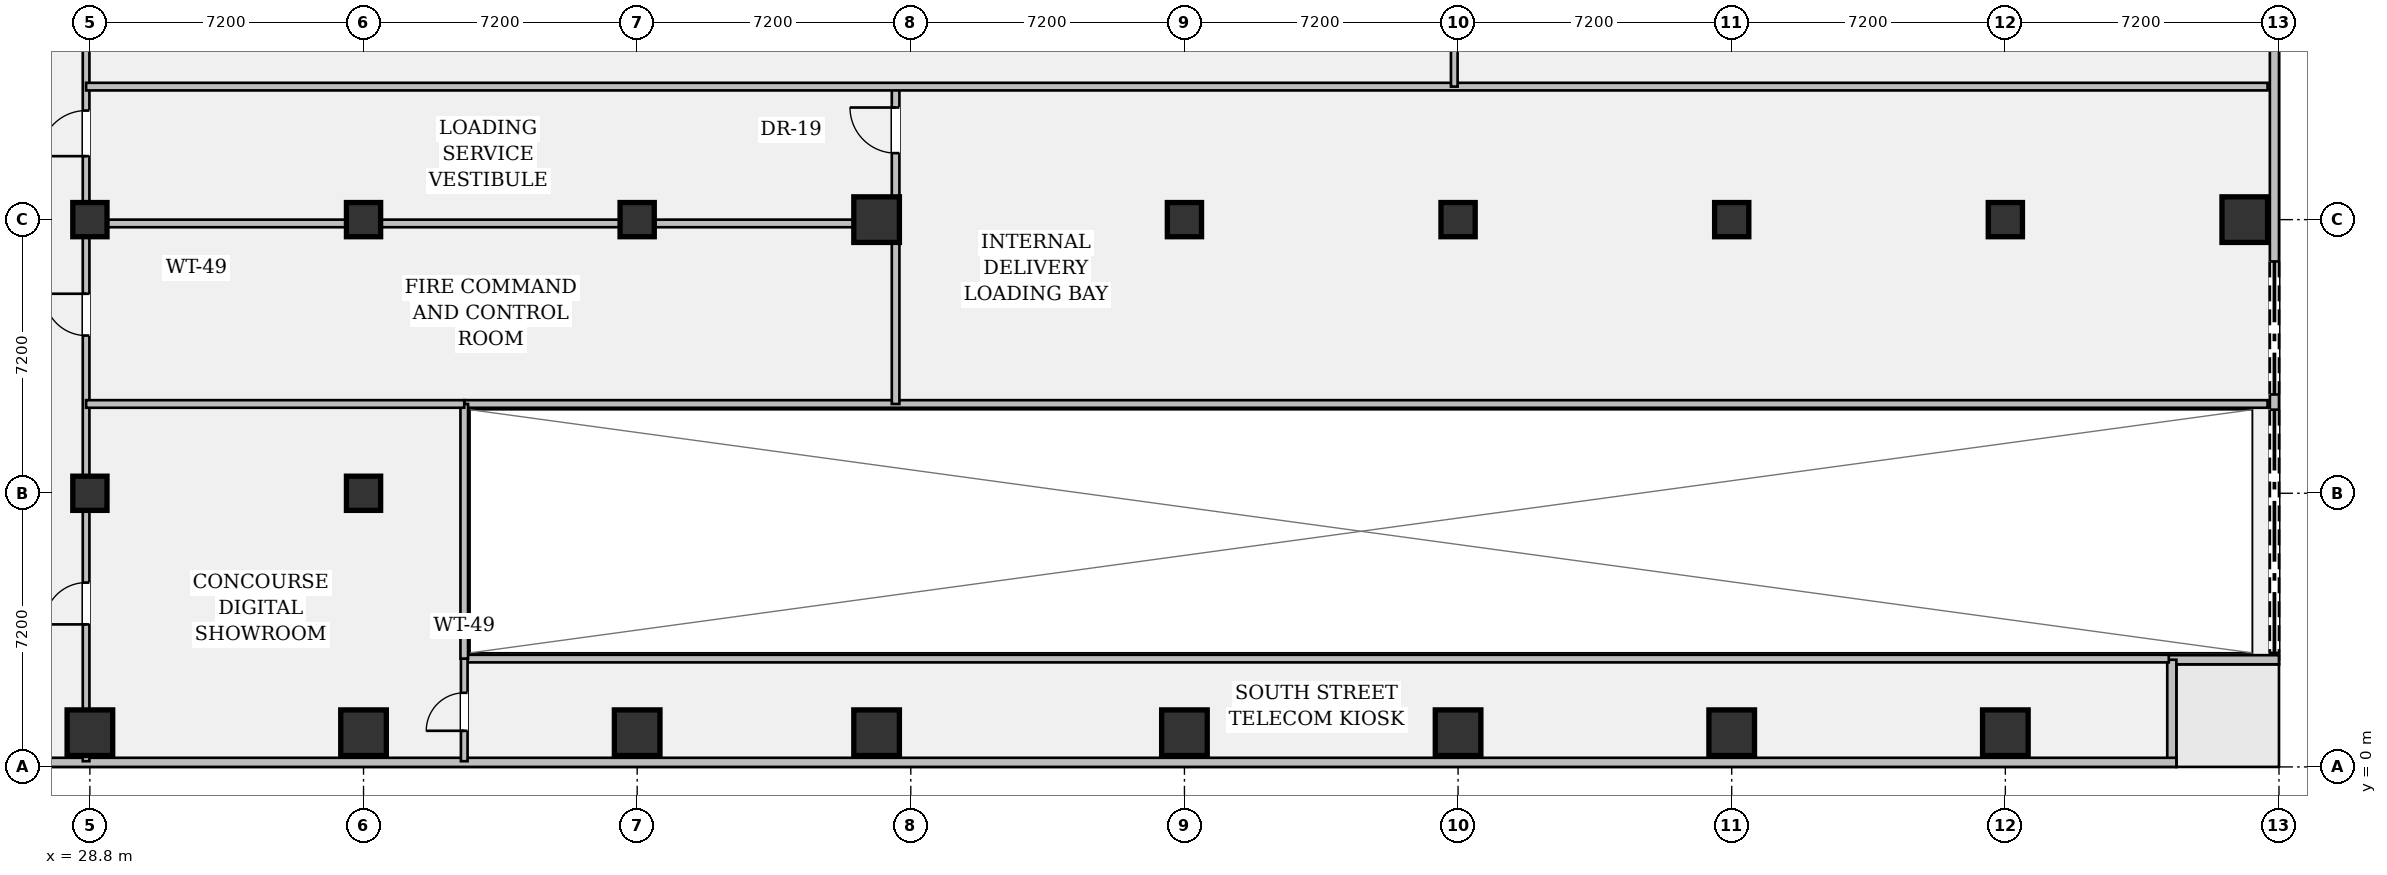
"""IFC4 building model, lengths in metres.
Left out: names, types, materials, properties, quantities, classifications, styles, units other than length and angle.
Written with IfcOpenShell. Run it as: python <this file> out.ifc"""

import sys

from ifc_helpers import new_model, si_unit, direction, frame, frame_2d, origin, origin_2d, place, context, subcontext, project, spatial, rectangle, hollow_rectangle, extrude, element, fill, save


model = new_model("IFC4")
c1 = context("Model", 3, precision=1e-05, world=origin(), true_north=direction((0.0, 1.0)))
c2 = subcontext(c1, "Body", "Model", "MODEL_VIEW")
j1 = project(units=[si_unit("LENGTHUNIT", "METRE"), si_unit("PLANEANGLEUNIT", "RADIAN")], contexts=[c1])
p1 = place(None, origin())
s1 = spatial("IfcSite", under=j1, at=p1, CompositionType="ELEMENT")
p2 = place(p1, origin())
s2 = spatial("IfcBuilding", under=s1, at=p2, CompositionType="ELEMENT")
p3 = place(p2, origin())
s3 = spatial("IfcBuildingStorey", under=s2, at=p3, CompositionType="ELEMENT", Elevation=0.0)
p4 = place(p3, frame((28.8, 0.9, 0.0), z_axis=(0.0, 0.0, 1.0), x_axis=(1.0, 0.0, 0.0)))
e1 = element("IfcColumn", 1, at=p4, inside=s3, PredefinedType="COLUMN", context=c2, shape_type="SweptSolid", body=[
    extrude(hollow_rectangle(XDim=1.2, YDim=1.2, WallThickness=0.075, at=origin_2d()), origin(), (0.0, 0.0, 1.0), 4.95),
])
for number, where, z_axis, x_axis in (
    (2, (28.8, 7.2, 0.0), (0.0, 0.0, 1.0), (1.0, 0.0, 0.0)),
    (3, (28.8, 14.4, 0.0), (0.0, 0.0, 1.0), (1.0, 0.0, 0.0)),
):
    element("IfcColumn", number, at=place(p3, frame(where, z_axis=z_axis, x_axis=x_axis)), inside=s3, PredefinedType="COLUMN", context=c2, shape_type="SweptSolid", body=[
        extrude(rectangle(XDim=0.9, YDim=0.9, at=origin_2d()), origin(), (0.0, 0.0, 1.0), 4.95),
    ])
p5 = place(p3, frame((36.0, 0.9, 0.0), z_axis=(0.0, 0.0, 1.0), x_axis=(1.0, 0.0, 0.0)))
e4 = element("IfcColumn", 4, at=p5, inside=s3, PredefinedType="COLUMN", context=c2, shape_type="SweptSolid", body=[
    extrude(hollow_rectangle(XDim=1.2, YDim=1.2, WallThickness=0.075, at=origin_2d()), origin(), (0.0, 0.0, 1.0), 4.95),
])
for number, where, z_axis, x_axis in (
    (5, (36.0, 7.2, 0.0), (0.0, 0.0, 1.0), (1.0, 0.0, 0.0)),
    (6, (36.0, 14.4, 0.0), (0.0, 0.0, 1.0), (1.0, 0.0, 0.0)),
):
    element("IfcColumn", number, at=place(p3, frame(where, z_axis=z_axis, x_axis=x_axis)), inside=s3, PredefinedType="COLUMN", context=c2, shape_type="SweptSolid", body=[
        extrude(rectangle(XDim=0.9, YDim=0.9, at=origin_2d()), origin(), (0.0, 0.0, 1.0), 4.95),
    ])
p6 = place(p3, frame((43.2, 0.9, 0.0), z_axis=(0.0, 0.0, 1.0), x_axis=(1.0, 0.0, 0.0)))
e7 = element("IfcColumn", 7, at=p6, inside=s3, PredefinedType="COLUMN", context=c2, shape_type="SweptSolid", body=[
    extrude(hollow_rectangle(XDim=1.2, YDim=1.2, WallThickness=0.075, at=origin_2d()), origin(), (0.0, 0.0, 1.0), 4.95),
])
p7 = place(p3, frame((43.2, 14.4, 0.0), z_axis=(0.0, 0.0, 1.0), x_axis=(1.0, 0.0, 0.0)))
e8 = element("IfcColumn", 8, at=p7, inside=s3, PredefinedType="COLUMN", context=c2, shape_type="SweptSolid", body=[
    extrude(rectangle(XDim=0.9, YDim=0.9, at=origin_2d()), origin(), (0.0, 0.0, 1.0), 4.95),
])
for number, where, z_axis, x_axis in (
    (9, (49.5, 0.9, 0.0), (0.0, 0.0, 1.0), (1.0, 0.0, 0.0)),
    (10, (49.5, 14.4, 0.0), (0.0, 0.0, 1.0), (1.0, 0.0, 0.0)),
    (11, (57.6, 0.9, 0.0), (0.0, 0.0, 1.0), (1.0, 0.0, 0.0)),
):
    element("IfcColumn", number, at=place(p3, frame(where, z_axis=z_axis, x_axis=x_axis)), inside=s3, PredefinedType="COLUMN", context=c2, shape_type="SweptSolid", body=[
        extrude(hollow_rectangle(XDim=1.2, YDim=1.2, WallThickness=0.075, at=origin_2d()), origin(), (0.0, 0.0, 1.0), 4.95),
    ])
p8 = place(p3, frame((57.6, 14.4, 0.0), z_axis=(0.0, 0.0, 1.0), x_axis=(1.0, 0.0, 0.0)))
e12 = element("IfcColumn", 12, at=p8, inside=s3, PredefinedType="COLUMN", context=c2, shape_type="SweptSolid", body=[
    extrude(rectangle(XDim=0.9, YDim=0.9, at=origin_2d()), origin(), (0.0, 0.0, 1.0), 4.95),
])
p9 = place(p3, frame((64.8, 0.9, 0.0), z_axis=(0.0, 0.0, 1.0), x_axis=(1.0, 0.0, 0.0)))
e13 = element("IfcColumn", 13, at=p9, inside=s3, PredefinedType="COLUMN", context=c2, shape_type="SweptSolid", body=[
    extrude(hollow_rectangle(XDim=1.2, YDim=1.2, WallThickness=0.075, at=origin_2d()), origin(), (0.0, 0.0, 1.0), 4.95),
])
p10 = place(p3, frame((64.8, 14.4, 0.0), z_axis=(0.0, 0.0, 1.0), x_axis=(1.0, 0.0, 0.0)))
e14 = element("IfcColumn", 14, at=p10, inside=s3, PredefinedType="COLUMN", context=c2, shape_type="SweptSolid", body=[
    extrude(rectangle(XDim=0.9, YDim=0.9, at=origin_2d()), origin(), (0.0, 0.0, 1.0), 4.95),
])
p11 = place(p3, frame((72.0, 0.9, 0.0), z_axis=(0.0, 0.0, 1.0), x_axis=(1.0, 0.0, 0.0)))
e15 = element("IfcColumn", 15, at=p11, inside=s3, PredefinedType="COLUMN", context=c2, shape_type="SweptSolid", body=[
    extrude(hollow_rectangle(XDim=1.2, YDim=1.2, WallThickness=0.075, at=origin_2d()), origin(), (0.0, 0.0, 1.0), 4.95),
])
p12 = place(p3, frame((72.0, 14.4, 0.0), z_axis=(0.0, 0.0, 1.0), x_axis=(1.0, 0.0, 0.0)))
e16 = element("IfcColumn", 16, at=p12, inside=s3, PredefinedType="COLUMN", context=c2, shape_type="SweptSolid", body=[
    extrude(rectangle(XDim=0.9, YDim=0.9, at=origin_2d()), origin(), (0.0, 0.0, 1.0), 4.95),
])
p13 = place(p3, frame((79.2, 0.9, 0.0), z_axis=(0.0, 0.0, 1.0), x_axis=(1.0, 0.0, 0.0)))
e17 = element("IfcColumn", 17, at=p13, inside=s3, PredefinedType="COLUMN", context=c2, shape_type="SweptSolid", body=[
    extrude(hollow_rectangle(XDim=1.2, YDim=1.2, WallThickness=0.075, at=origin_2d()), origin(), (0.0, 0.0, 1.0), 4.95),
])
p14 = place(p3, frame((79.2, 14.4, 0.0), z_axis=(0.0, 0.0, 1.0), x_axis=(1.0, 0.0, 0.0)))
e18 = element("IfcColumn", 18, at=p14, inside=s3, PredefinedType="COLUMN", context=c2, shape_type="SweptSolid", body=[
    extrude(rectangle(XDim=0.9, YDim=0.9, at=origin_2d()), origin(), (0.0, 0.0, 1.0), 4.95),
])
p15 = place(p3, frame((85.5, 14.4, 0.0), z_axis=(0.0, 0.0, 1.0), x_axis=(1.0, 0.0, 0.0)))
e19 = element("IfcColumn", 19, at=p15, inside=s3, PredefinedType="COLUMN", context=c2, shape_type="SweptSolid", body=[
    extrude(hollow_rectangle(XDim=1.2, YDim=1.2, WallThickness=0.075, at=origin_2d()), origin(), (0.0, 0.0, 1.0), 4.95),
])
p16 = place(p3, frame((86.28, 25.98, 0.0), z_axis=(0.0, 0.0, 1.0), x_axis=(0.0, -1.0, 0.0)))
e20 = element("IfcWall", 20, at=p16, inside=s3, PredefinedType="STANDARD", context=c2, shape_type="SweptSolid", body=[
    extrude(rectangle(XDim=23.16, YDim=0.24, at=frame_2d((11.58, 0.0))), origin(), (0.0, 0.0, 1.0), 4.95),
])
p17 = place(p16, frame((16.58, 0.0, 0.0)))
e21 = element("IfcOpeningElement", 21, at=p17, cuts=e20, PredefinedType="OPENING", context=c2, shape_type="SweptSolid", body=[
    extrude(rectangle(XDim=6.4, YDim=4.0, at=frame_2d((3.2, 2.0))), frame((0.0, 0.132, 0.0), z_axis=(0.0, -1.0, 0.0), x_axis=(1.0, 0.0, 0.0)), (0.0, 0.0, 1.0), 0.264),
])
p18 = place(p16, frame((12.68, 0.0, 0.0)))
e22 = element("IfcOpeningElement", 22, at=p18, cuts=e20, PredefinedType="OPENING", context=c2, shape_type="SweptSolid", body=[
    extrude(rectangle(XDim=3.5, YDim=3.9, at=frame_2d((1.75, 1.95))), frame((0.0, 0.132, 0.0), z_axis=(0.0, -1.0, 0.0), x_axis=(1.0, 0.0, 0.0)), (0.0, 0.0, 1.0), 0.264),
])
p19 = place(p3, frame((86.4, 2.82, 0.0), z_axis=(0.0, 0.0, 1.0), x_axis=(-1.0, 0.0, 0.0)))
e23 = element("IfcWall", 23, at=p19, inside=s3, PredefinedType="STANDARD", context=c2, shape_type="SweptSolid", body=[
    extrude(rectangle(XDim=2.94, YDim=0.24, at=frame_2d((1.47, 0.0))), origin(), (0.0, 0.0, 1.0), 4.95),
])
p20 = place(p3, frame((83.58, 2.82, 0.0), z_axis=(0.0, 0.0, 1.0), x_axis=(0.0, -1.0, 0.0)))
e24 = element("IfcWall", 24, at=p20, inside=s3, PredefinedType="STANDARD", context=c2, shape_type="SweptSolid", body=[
    extrude(rectangle(XDim=2.7, YDim=0.24, at=frame_2d((1.35, 0.0))), origin(), (0.0, 0.0, 1.0), 4.95),
])
p21 = place(p3, frame((83.7, 0.12, 0.0), z_axis=(0.0, 0.0, 1.0), x_axis=(-1.0, 0.0, 0.0)))
e25 = element("IfcWall", 25, at=p21, inside=s3, PredefinedType="STANDARD", context=c2, shape_type="SweptSolid", body=[
    extrude(rectangle(XDim=81.0, YDim=0.24, at=frame_2d((40.5, 0.0))), origin(), (0.0, 0.0, 1.0), 4.95),
])
p22 = place(p21, frame((72.9, 0.0, 0.0)))
e26 = element("IfcOpeningElement", 26, at=p22, cuts=e25, PredefinedType="OPENING", context=c2, shape_type="SweptSolid", body=[
    extrude(rectangle(XDim=1.8, YDim=2.2, at=frame_2d((0.9, 1.1))), frame((0.0, 0.132, 0.0), z_axis=(0.0, -1.0, 0.0), x_axis=(1.0, 0.0, 0.0)), (0.0, 0.0, 1.0), 0.264),
])
p23 = place(p21, frame((64.5, 0.0, 0.0)))
e27 = element("IfcOpeningElement", 27, at=p23, cuts=e25, PredefinedType="OPENING", context=c2, shape_type="SweptSolid", body=[
    extrude(rectangle(XDim=1.8, YDim=2.2, at=frame_2d((0.9, 1.1))), frame((0.0, 0.132, 0.0), z_axis=(0.0, -1.0, 0.0), x_axis=(1.0, 0.0, 0.0)), (0.0, 0.0, 1.0), 0.264),
])
p24 = place(p21, frame((57.9, 0.0, 0.0)))
e28 = element("IfcOpeningElement", 28, at=p24, cuts=e25, PredefinedType="OPENING", context=c2, shape_type="SweptSolid", body=[
    extrude(rectangle(XDim=1.8, YDim=2.2, at=frame_2d((0.9, 1.1))), frame((0.0, 0.132, 0.0), z_axis=(0.0, -1.0, 0.0), x_axis=(1.0, 0.0, 0.0)), (0.0, 0.0, 1.0), 0.264),
])
p25 = place(p3, frame((28.7, 0.15, 0.0), z_axis=(0.0, 0.0, 1.0), x_axis=(0.0, 1.0, 0.0)))
e29 = element("IfcWall", 29, at=p25, inside=s3, PredefinedType="PARTITIONING", context=c2, shape_type="SweptSolid", body=[
    extrude(rectangle(XDim=25.97, YDim=0.175, at=frame_2d((12.985, 0.0))), origin(), (0.0, 0.0, 1.0), 3.988),
])
p26 = place(p25, frame((11.2, 0.0, 0.0)))
e30 = element("IfcOpeningElement", 30, at=p26, cuts=e29, PredefinedType="OPENING", context=c2, shape_type="SweptSolid", body=[
    extrude(rectangle(XDim=1.1, YDim=2.15, at=frame_2d((0.55, 1.075))), frame((0.0, 0.1, 0.0), z_axis=(0.0, -1.0, 0.0), x_axis=(1.0, 0.0, 0.0)), (0.0, 0.0, 1.0), 0.199),
])
p27 = place(p25, frame((15.92, 0.0, 0.0)))
e31 = element("IfcOpeningElement", 31, at=p27, cuts=e29, PredefinedType="OPENING", context=c2, shape_type="SweptSolid", body=[
    extrude(rectangle(XDim=1.2, YDim=2.15, at=frame_2d((0.6, 1.075))), frame((0.0, 0.1, 0.0), z_axis=(0.0, -1.0, 0.0), x_axis=(1.0, 0.0, 0.0)), (0.0, 0.0, 1.0), 0.199),
])
p28 = place(p25, frame((23.24, 0.0, 0.0)))
e32 = element("IfcOpeningElement", 32, at=p28, cuts=e29, PredefinedType="OPENING", context=c2, shape_type="SweptSolid", body=[
    extrude(rectangle(XDim=1.6, YDim=2.2, at=frame_2d((0.8, 1.1))), frame((0.0, 0.1, 0.0), z_axis=(0.0, -1.0, 0.0), x_axis=(1.0, 0.0, 0.0)), (0.0, 0.0, 1.0), 0.199),
])
p29 = place(p25, frame((3.6, 0.0, 0.0)))
e33 = element("IfcOpeningElement", 33, at=p29, cuts=e29, PredefinedType="OPENING", context=c2, shape_type="SweptSolid", body=[
    extrude(rectangle(XDim=1.1, YDim=2.15, at=frame_2d((0.55, 1.075))), frame((0.0, 0.1, 0.0), z_axis=(0.0, -1.0, 0.0), x_axis=(1.0, 0.0, 0.0)), (0.0, 0.0, 1.0), 0.199),
])
p30 = place(p3, frame((38.65, 2.85, 0.0), z_axis=(0.0, 0.0, 1.0), x_axis=(1.0, 0.0, 0.0)))
e34 = element("IfcWall", 34, at=p30, inside=s3, PredefinedType="PARTITIONING", context=c2, shape_type="SweptSolid", body=[
    extrude(rectangle(XDim=44.85, YDim=0.2, at=frame_2d((22.425, 0.0))), origin(), (0.0, 0.0, 1.0), 2.535),
])
p31 = place(p3, frame((38.65, 9.55, 0.0), z_axis=(0.0, 0.0, 1.0), x_axis=(1.0, 0.0, 0.0)))
e35 = element("IfcWall", 35, at=p31, inside=s3, PredefinedType="PARTITIONING", context=c2, shape_type="SweptSolid", body=[
    extrude(rectangle(XDim=47.45, YDim=0.2, at=frame_2d((23.725, 0.0))), origin(), (0.0, 0.0, 1.0), 2.535),
])
p32 = place(p3, frame((38.65, 0.15, 0.0), z_axis=(0.0, 0.0, 1.0), x_axis=(0.0, 1.0, 0.0)))
e36 = element("IfcWall", 36, at=p32, inside=s3, PredefinedType="PARTITIONING", context=c2, shape_type="SweptSolid", body=[
    extrude(rectangle(XDim=2.7, YDim=0.175, at=frame_2d((1.35, 0.0))), origin(), (0.0, 0.0, 1.0), 4.313),
])
p33 = place(p32, frame((0.8, 0.0, 0.0)))
e37 = element("IfcOpeningElement", 37, at=p33, cuts=e36, PredefinedType="OPENING", context=c2, shape_type="SweptSolid", body=[
    extrude(rectangle(XDim=1.0, YDim=2.15, at=frame_2d((0.5, 1.075))), frame((0.0, 0.1, 0.0), z_axis=(0.0, -1.0, 0.0), x_axis=(1.0, 0.0, 0.0)), (0.0, 0.0, 1.0), 0.199),
])
p34 = place(p3, frame((38.65, 2.85, 0.0), z_axis=(0.0, 0.0, 1.0), x_axis=(0.0, 1.0, 0.0)))
e38 = element("IfcWall", 38, at=p34, inside=s3, PredefinedType="PARTITIONING", context=c2, shape_type="SweptSolid", body=[
    extrude(rectangle(XDim=6.7, YDim=0.2, at=frame_2d((3.35, 0.0))), origin(), (0.0, 0.0, 1.0), 4.95),
])
p35 = place(p3, frame((28.7, 9.55, 0.0), z_axis=(0.0, 0.0, 1.0), x_axis=(1.0, 0.0, 0.0)))
e39 = element("IfcWall", 39, at=p35, inside=s3, PredefinedType="PARTITIONING", context=c2, shape_type="SweptSolid", body=[
    extrude(rectangle(XDim=9.95, YDim=0.2, at=frame_2d((4.975, 0.0))), origin(), (0.0, 0.0, 1.0), 3.988),
])
p36 = place(p3, frame((28.7, 14.3, 0.0), z_axis=(0.0, 0.0, 1.0), x_axis=(1.0, 0.0, 0.0)))
e40 = element("IfcWall", 40, at=p36, inside=s3, PredefinedType="PARTITIONING", context=c2, shape_type="SweptSolid", body=[
    extrude(rectangle(XDim=21.3, YDim=0.2, at=frame_2d((10.65, 0.0))), origin(), (0.0, 0.0, 1.0), 3.988),
])
p37 = place(p3, frame((50.0, 9.55, 0.0), z_axis=(0.0, 0.0, 1.0), x_axis=(0.0, 1.0, 0.0)))
e41 = element("IfcWall", 41, at=p37, inside=s3, PredefinedType="PARTITIONING", context=c2, shape_type="SweptSolid", body=[
    extrude(rectangle(XDim=8.35, YDim=0.2, at=frame_2d((4.175, 0.0))), origin(), (0.0, 0.0, 1.0), 2.535),
])
p38 = place(p37, frame((6.6, 0.0, 0.0)))
e42 = element("IfcOpeningElement", 42, at=p38, cuts=e41, PredefinedType="OPENING", context=c2, shape_type="SweptSolid", body=[
    extrude(rectangle(XDim=1.2, YDim=2.15, at=frame_2d((0.6, 1.075))), frame((0.0, 0.112, 0.0), z_axis=(0.0, -1.0, 0.0), x_axis=(1.0, 0.0, 0.0)), (0.0, 0.0, 1.0), 0.224),
])
p39 = place(p3, frame((28.7, 17.9, 0.0), z_axis=(0.0, 0.0, 1.0), x_axis=(1.0, 0.0, 0.0)))
e43 = element("IfcWall", 43, at=p39, inside=s3, PredefinedType="PARTITIONING", context=c2, shape_type="SweptSolid", body=[
    extrude(rectangle(XDim=57.4, YDim=0.2, at=frame_2d((28.7, 0.0))), origin(), (0.0, 0.0, 1.0), 3.988),
])
p40 = place(p3, frame((64.7, 17.9, 0.0), z_axis=(0.0, 0.0, 1.0), x_axis=(0.0, 1.0, 0.0)))
e44 = element("IfcWall", 44, at=p40, inside=s3, PredefinedType="PARTITIONING", context=c2, shape_type="SweptSolid", body=[
    extrude(rectangle(XDim=10.78, YDim=0.175, at=frame_2d((5.39, 0.0))), origin(), (0.0, 0.0, 1.0), 3.988),
])
p41 = place(p40, frame((8.8, 0.0, 0.0)))
e45 = element("IfcOpeningElement", 45, at=p41, cuts=e44, PredefinedType="OPENING", context=c2, shape_type="SweptSolid", body=[
    extrude(rectangle(XDim=1.2, YDim=2.15, at=frame_2d((0.6, 1.075))), frame((0.0, 0.1, 0.0), z_axis=(0.0, -1.0, 0.0), x_axis=(1.0, 0.0, 0.0)), (0.0, 0.0, 1.0), 0.199),
])
p42 = place(p17, origin())
e46 = element("IfcDoor", 46, at=p42, inside=s3, OperationType="ROLLINGUP", PredefinedType="GATE", context=c2, shape_type="SweptSolid", body=[
    extrude(rectangle(XDim=6.4, YDim=4.0, at=frame_2d((3.2, 2.0))), frame((0.0, 0.025, 0.0), z_axis=(0.0, -1.0, 0.0), x_axis=(1.0, 0.0, 0.0)), (0.0, 0.0, 1.0), 0.05),
])
fill(e21, e46)
p43 = place(p18, origin())
e47 = element("IfcDoor", 47, at=p43, inside=s3, OperationType="ROLLINGUP", PredefinedType="GATE", context=c2, shape_type="SweptSolid", body=[
    extrude(rectangle(XDim=3.5, YDim=3.9, at=frame_2d((1.75, 1.95))), frame((0.0, 0.025, 0.0), z_axis=(0.0, -1.0, 0.0), x_axis=(1.0, 0.0, 0.0)), (0.0, 0.0, 1.0), 0.05),
])
fill(e22, e47)
p44 = place(p26, origin())
e48 = element("IfcDoor", 48, at=p44, inside=s3, OperationType="SINGLE_SWING_RIGHT", PredefinedType="DOOR", context=c2, shape_type="SweptSolid", body=[
    extrude(rectangle(XDim=1.1, YDim=2.15, at=frame_2d((0.55, 1.075))), frame((0.0, 0.025, 0.0), z_axis=(0.0, -1.0, 0.0), x_axis=(1.0, 0.0, 0.0)), (0.0, 0.0, 1.0), 0.05),
])
fill(e30, e48)
p45 = place(p27, origin())
e49 = element("IfcDoor", 49, at=p45, inside=s3, OperationType="SINGLE_SWING_LEFT", PredefinedType="DOOR", context=c2, shape_type="SweptSolid", body=[
    extrude(rectangle(XDim=1.2, YDim=2.15, at=frame_2d((0.6, 1.075))), frame((0.0, 0.025, 0.0), z_axis=(0.0, -1.0, 0.0), x_axis=(1.0, 0.0, 0.0)), (0.0, 0.0, 1.0), 0.05),
])
fill(e31, e49)
p46 = place(p38, origin())
e50 = element("IfcDoor", 50, at=p46, inside=s3, OperationType="SINGLE_SWING_RIGHT", PredefinedType="DOOR", context=c2, shape_type="SweptSolid", body=[
    extrude(rectangle(XDim=1.2, YDim=2.15, at=frame_2d((0.6, 1.075))), frame((0.0, 0.025, 0.0), z_axis=(0.0, -1.0, 0.0), x_axis=(1.0, 0.0, 0.0)), (0.0, 0.0, 1.0), 0.05),
])
fill(e42, e50)
p47 = place(p29, origin())
e51 = element("IfcDoor", 51, at=p47, inside=s3, OperationType="SINGLE_SWING_LEFT", PredefinedType="DOOR", context=c2, shape_type="SweptSolid", body=[
    extrude(rectangle(XDim=1.1, YDim=2.15, at=frame_2d((0.55, 1.075))), frame((0.0, 0.025, 0.0), z_axis=(0.0, -1.0, 0.0), x_axis=(1.0, 0.0, 0.0)), (0.0, 0.0, 1.0), 0.05),
])
fill(e33, e51)
p48 = place(p33, origin())
e52 = element("IfcDoor", 52, at=p48, inside=s3, OperationType="SINGLE_SWING_LEFT", PredefinedType="DOOR", context=c2, shape_type="SweptSolid", body=[
    extrude(rectangle(XDim=1.0, YDim=2.15, at=frame_2d((0.5, 1.075))), frame((0.0, 0.025, 0.0), z_axis=(0.0, -1.0, 0.0), x_axis=(1.0, 0.0, 0.0)), (0.0, 0.0, 1.0), 0.05),
])
fill(e37, e52)
save(model, sys.argv[1])
